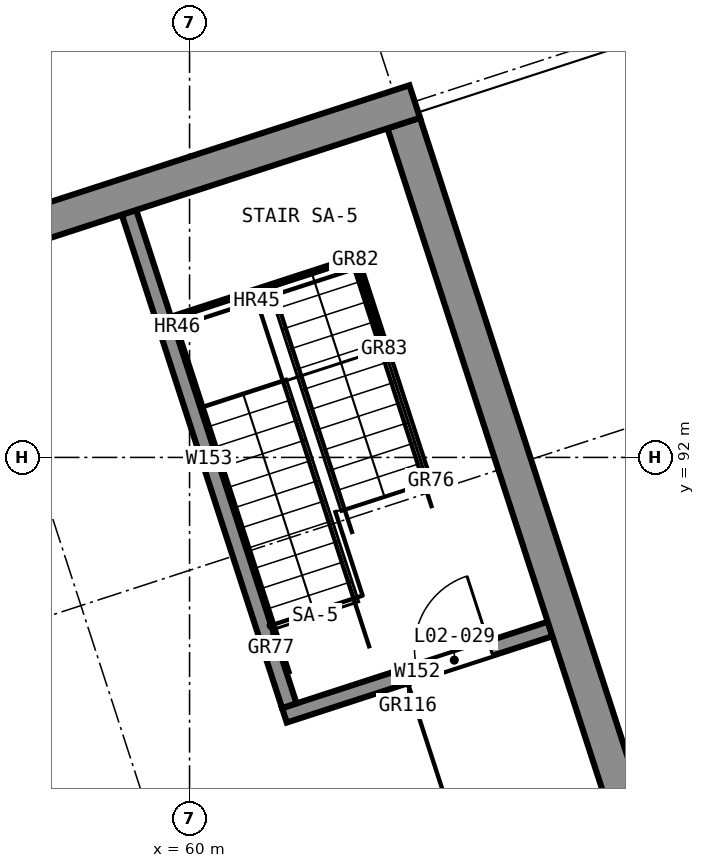
"""IFC4 building model, lengths in metres.
Left out: names, types, materials, properties, quantities, classifications, styles, units other than length and angle.
Written with IfcOpenShell. Run it as: python <this file> out.ifc"""

import sys

from ifc_helpers import new_model, si_unit, direction, frame, frame_2d, origin, place, context, subcontext, project, spatial, rectangle, extrude, element, fill, save


model = new_model("IFC4")
c1 = context("Model", 3, precision=1e-05, world=origin(), true_north=direction((0.0, 1.0)))
c2 = subcontext(c1, "Body", "Model", "MODEL_VIEW")
j1 = project(units=[si_unit("LENGTHUNIT", "METRE"), si_unit("PLANEANGLEUNIT", "RADIAN")], contexts=[c1])
p1 = place(None, origin())
s1 = spatial("IfcSite", under=j1, at=p1, CompositionType="ELEMENT")
p2 = place(p1, origin())
s2 = spatial("IfcBuilding", under=s1, at=p2, CompositionType="ELEMENT")
p3 = place(p2, frame((0.0, 0.0, 9.5)))
s3 = spatial("IfcBuildingStorey", under=s2, at=p3, CompositionType="ELEMENT", Elevation=9.5)
p4 = place(p3, frame((68.866, 77.781, 0.0), z_axis=(0.0, 0.0, 1.0), x_axis=(-0.309019798438, 0.951055605195, 0.0)))
e1 = element("IfcWall", 1, at=p4, inside=s3, PredefinedType="SHEAR", context=c2, shape_type="SweptSolid", body=[
    extrude(rectangle(XDim=19.575, YDim=0.45, at=frame_2d((9.788, 0.0))), origin(), (0.0, 0.0, 1.0), 4.0),
])
p5 = place(p3, frame((34.953, 87.581, 0.0), z_axis=(0.0, 0.0, 1.0), x_axis=(0.951059165148, 0.309008841924, 0.0)))
e2 = element("IfcWall", 2, at=p5, inside=s3, PredefinedType="SHEAR", context=c2, shape_type="SweptSolid", body=[
    extrude(rectangle(XDim=29.45, YDim=0.45, at=frame_2d((14.725, 0.0))), origin(), (0.0, 0.0, 1.0), 4.0),
])
p6 = place(p3, frame((64.743, 89.743, 0.0), z_axis=(0.0, 0.0, 1.0), x_axis=(-0.95104773735, -0.309044011885, 0.0)))
e3 = element("IfcWall", 3, at=p6, inside=s3, PredefinedType="SOLIDWALL", context=c2, shape_type="SweptSolid", body=[
    extrude(rectangle(XDim=3.675, YDim=0.2, at=frame_2d((1.837, 0.0))), origin(), (0.0, 0.0, 1.0), 4.0),
])
p7 = place(p6, frame((0.825, 0.0, 0.0)))
e4 = element("IfcOpeningElement", 4, at=p7, cuts=e3, PredefinedType="OPENING", context=c2, shape_type="SweptSolid", body=[
    extrude(rectangle(XDim=1.0, YDim=2.1, at=frame_2d((0.5, 1.05))), frame((0.0, 0.11, 0.0), z_axis=(0.0, -1.0, 0.0), x_axis=(1.0, 0.0, 0.0)), (0.0, 0.0, 1.0), 0.22),
])
p8 = place(p3, frame((61.312, 88.733, 0.0), z_axis=(0.0, 0.0, 1.0), x_axis=(-0.309028643499, 0.951052731186, 0.0)))
e5 = element("IfcWall", 5, at=p8, inside=s3, PredefinedType="SOLIDWALL", context=c2, shape_type="SweptSolid", body=[
    extrude(rectangle(XDim=6.825, YDim=0.2, at=frame_2d((3.413, 0.0))), origin(), (0.0, 0.0, 1.0), 4.0),
])
p9 = place(p7, frame((1.0, 0.0, 0.0), z_axis=(0.0, 0.0, 1.0), x_axis=(-1.0, 0.0, 0.0)))
e6 = element("IfcDoor", 6, at=p9, inside=s3, OperationType="SINGLE_SWING_LEFT", PredefinedType="DOOR", context=c2, shape_type="SweptSolid", body=[
    extrude(rectangle(XDim=1.0, YDim=2.1, at=frame_2d((0.5, 1.05))), frame((0.0, 0.025, 0.0), z_axis=(0.0, -1.0, 0.0), x_axis=(1.0, 0.0, 0.0)), (0.0, 0.0, 1.0), 0.05),
])
fill(e4, e6)
save(model, sys.argv[1])
